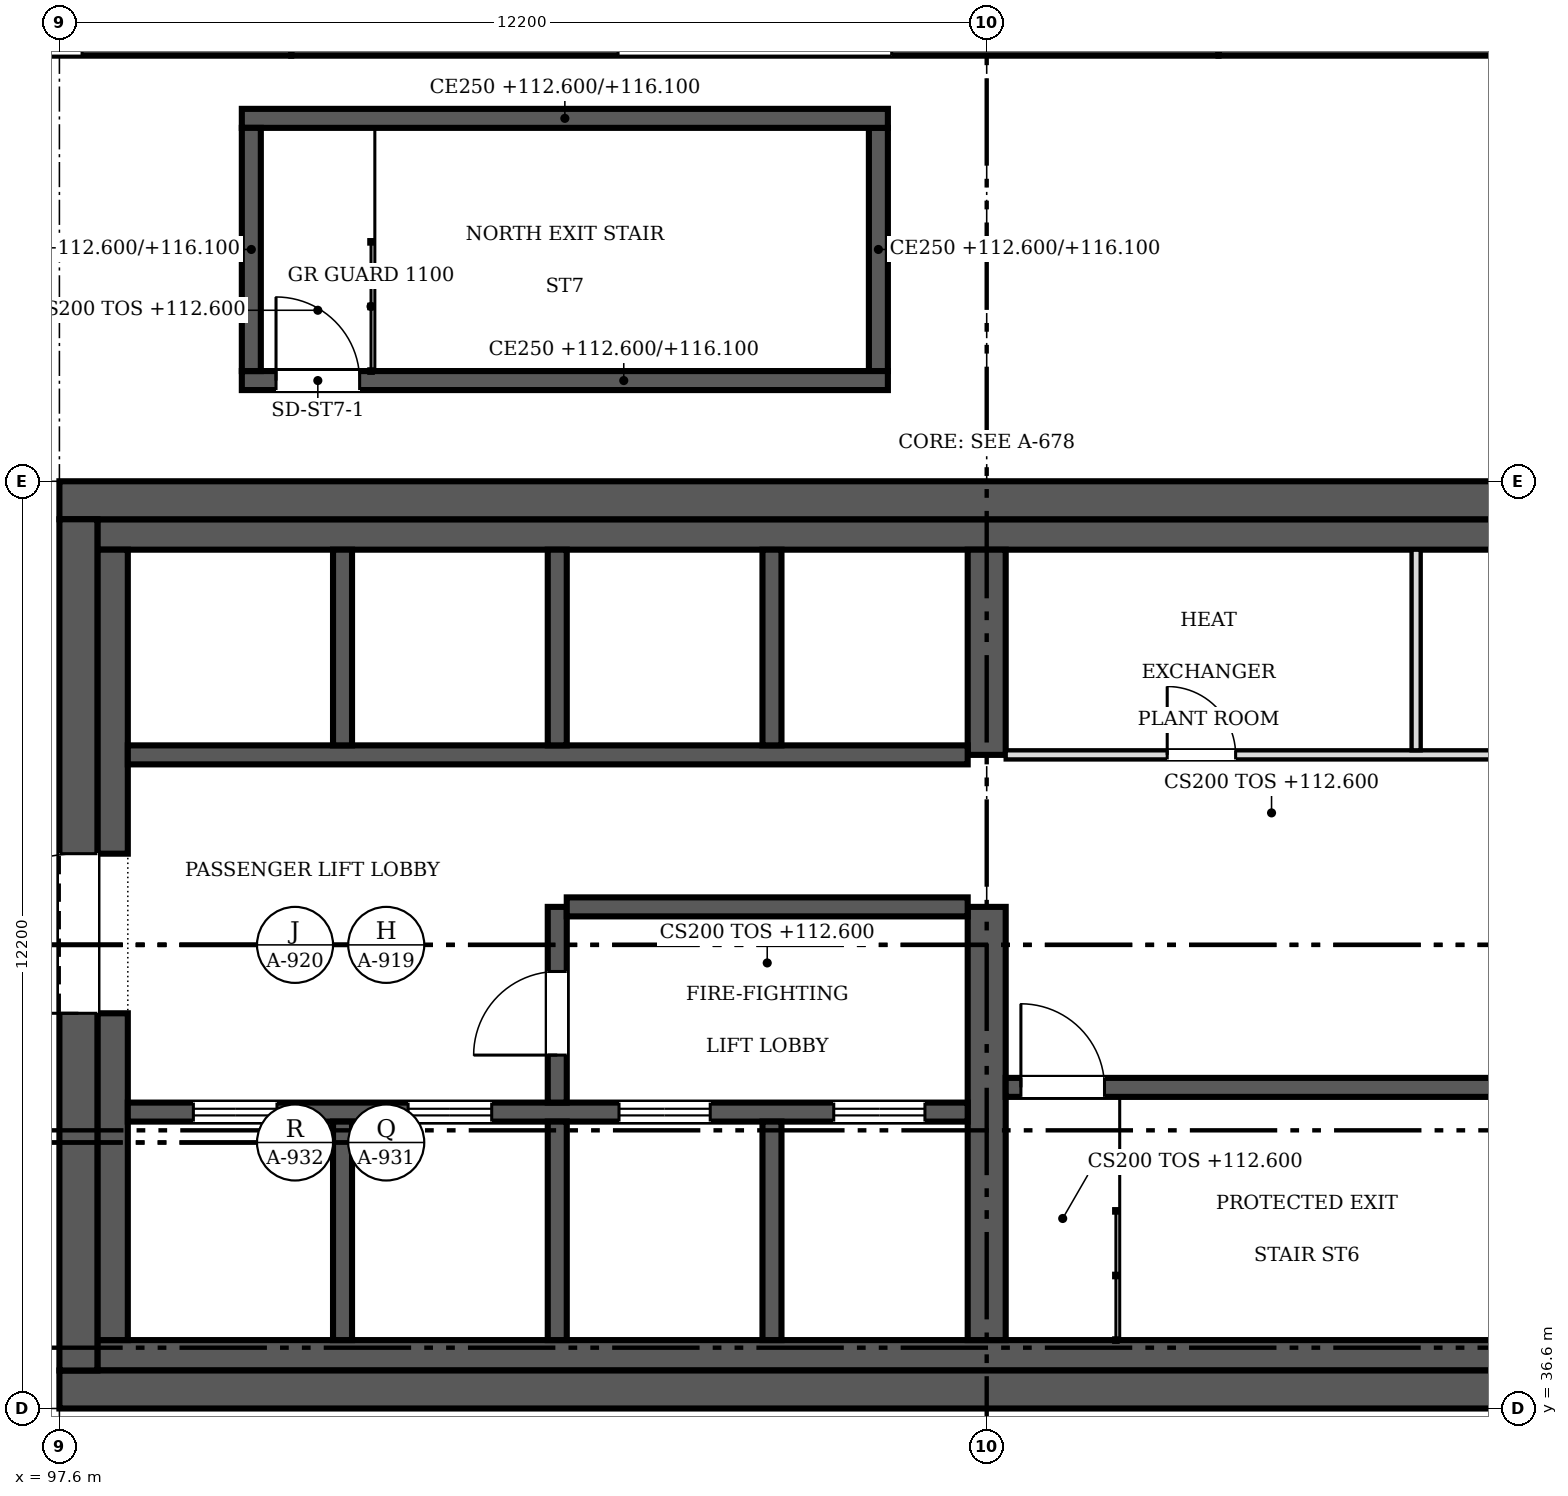
"""IFC4 building model, lengths in metres.
Left out: names, types, materials, properties, quantities, classifications, styles, units other than length and angle.
Written with IfcOpenShell. Run it as: python <this file> out.ifc"""

import sys

from ifc_helpers import new_model, si_unit, direction, frame, frame_2d, origin, place, context, subcontext, project, spatial, polyline, rectangle, outline, extrude, faceted_brep, source, transform, mapped, element, fill, save


model = new_model("IFC4")
c1 = context("Model", 3, precision=1e-05, world=origin(), true_north=direction((0.0, 1.0)))
c2 = subcontext(c1, "Body", "Model", "MODEL_VIEW")
j1 = project(units=[si_unit("LENGTHUNIT", "METRE"), si_unit("PLANEANGLEUNIT", "RADIAN")], contexts=[c1])
p1 = place(None, origin())
s1 = spatial("IfcSite", under=j1, at=p1, CompositionType="ELEMENT")
p2 = place(p1, origin())
s2 = spatial("IfcBuilding", under=s1, at=p2, CompositionType="ELEMENT")
p3 = place(p2, frame((0.0, 0.0, 112.6)))
s3 = spatial("IfcBuildingStorey", under=s2, at=p3, CompositionType="ELEMENT", Elevation=112.6)
m1 = source(origin(), c2, "Body", "Brep", [
    faceted_brep([(0.0, -0.25, 0.0), (11.95, -0.25, 0.0), (11.95, -0.25, 3.8), (0.0, -0.25, 3.8), (0.25, 0.25, 3.8), (11.95, 0.25, 3.8), (11.95, 0.25, 0.0), (0.25, 0.25, 0.0), (0.0, 0.0, 0.0), (0.0, 0.0, 3.8)], [[[0, 1, 2, 3]], [[4, 5, 6, 7]], [[7, 6, 1, 0, 8]], [[6, 5, 2, 1]], [[5, 4, 9, 3, 2]], [[8, 0, 3, 9]], [[7, 8, 9, 4]]]),
])
p4 = place(p3, frame((124.8, 54.65, 0.0), z_axis=(0.0, 0.0, 1.0), x_axis=(-1.0, 0.0, 0.0)))
e1 = element("IfcWall", 1, at=p4, inside=s3, PredefinedType="SOLIDWALL", context=c2, shape_type="MappedRepresentation", body=[
    mapped(m1, transform((0.0, 0.0, 0.0), scale=1.0)),
])
m2 = source(origin(), c2, "Body", "SweptSolid", [
    extrude(outline(polyline([(4.175, 0.8), (7.775, 0.8), (7.775, 3.0), (4.175, 3.0), (4.175, 0.8)])), frame((0.0, 0.26, 0.0), z_axis=(0.0, -1.0, 0.0), x_axis=(1.0, 0.0, 0.0)), (0.0, 0.0, 1.0), 0.52),
])
p5 = place(p4, origin())
e2 = element("IfcOpeningElement", 2, at=p5, cuts=e1, PredefinedType="OPENING", context=c2, shape_type="MappedRepresentation", body=[
    mapped(m2, transform((0.0, 0.0, 0.0), scale=1.0)),
])
m3 = source(origin(), c2, "Body", "SweptSolid", [
    extrude(outline(polyline([(0.0, 0.0), (12.2, 0.0), (12.2, 3.8), (0.0, 3.8), (0.0, 0.0)])), frame((0.0, 0.25, 0.0), z_axis=(0.0, -1.0, 0.0), x_axis=(1.0, 0.0, 0.0)), (0.0, 0.0, 1.0), 0.5),
])
p6 = place(p3, frame((112.85, 54.65, 0.0), z_axis=(0.0, 0.0, 1.0), x_axis=(-1.0, 0.0, 0.0)))
e3 = element("IfcWall", 3, at=p6, inside=s3, PredefinedType="SOLIDWALL", context=c2, shape_type="MappedRepresentation", body=[
    mapped(m3, transform((0.0, 0.0, 0.0), scale=1.0)),
])
m4 = source(origin(), c2, "Body", "SweptSolid", [
    extrude(outline(polyline([(4.3, 0.8), (7.9, 0.8), (7.9, 3.0), (4.3, 3.0), (4.3, 0.8)])), frame((0.0, 0.26, 0.0), z_axis=(0.0, -1.0, 0.0), x_axis=(1.0, 0.0, 0.0)), (0.0, 0.0, 1.0), 0.52),
])
p7 = place(p6, origin())
e4 = element("IfcOpeningElement", 4, at=p7, cuts=e3, PredefinedType="OPENING", context=c2, shape_type="MappedRepresentation", body=[
    mapped(m4, transform((0.0, 0.0, 0.0), scale=1.0)),
])
m5 = source(origin(), c2, "Body", "Brep", [
    faceted_brep([(0.0, -0.25, 0.0), (9.104, -0.25, 0.0), (9.104, -0.25, 3.8), (0.0, -0.25, 3.8), (0.0, 0.25, 3.8), (9.057, 0.25, 3.8), (9.057, 0.25, 0.0), (0.0, 0.25, 0.0), (9.104, -0.0, 0.0), (9.104, -0.0, 3.8)], [[[0, 1, 2, 3]], [[4, 5, 6, 7]], [[7, 6, 8, 1, 0]], [[9, 2, 1, 8]], [[5, 4, 3, 2, 9]], [[4, 7, 0, 3]], [[8, 6, 5, 9]]]),
])
p8 = place(p3, frame((100.65, 54.65, 0.0), z_axis=(0.0, 0.0, 1.0), x_axis=(-1.0, 0.0, 0.0)))
e5 = element("IfcWall", 5, at=p8, inside=s3, PredefinedType="SOLIDWALL", context=c2, shape_type="MappedRepresentation", body=[
    mapped(m5, transform((0.0, 0.0, 0.0), scale=1.0)),
])
m6 = source(origin(), c2, "Body", "SweptSolid", [
    extrude(outline(polyline([(2.752, 0.8), (6.352, 0.8), (6.352, 3.0), (2.752, 3.0), (2.752, 0.8)])), frame((0.0, 0.26, 0.0), z_axis=(0.0, -1.0, 0.0), x_axis=(1.0, 0.0, 0.0)), (0.0, 0.0, 1.0), 0.52),
])
p9 = place(p8, origin())
e6 = element("IfcOpeningElement", 6, at=p9, cuts=e5, PredefinedType="OPENING", context=c2, shape_type="MappedRepresentation", body=[
    mapped(m6, transform((0.0, 0.0, 0.0), scale=1.0)),
])
p10 = place(p3, frame((122.0, 36.85, 0.0), z_axis=(0.0, 0.0, 1.0), x_axis=(-1.0, 0.0, 0.0)))
e7 = element("IfcWall", 7, at=p10, inside=s3, PredefinedType="SHEAR", context=c2, shape_type="SweptSolid", body=[
    extrude(rectangle(XDim=24.4, YDim=0.5, at=frame_2d((12.2, 0.0))), origin(), (0.0, 0.0, 1.0), 3.5),
])
p11 = place(p3, frame((97.85, 37.1, 0.0), z_axis=(0.0, 0.0, 1.0), x_axis=(0.0, 1.0, 0.0)))
e8 = element("IfcWall", 8, at=p11, inside=s3, PredefinedType="SHEAR", context=c2, shape_type="SweptSolid", body=[
    extrude(rectangle(XDim=11.2, YDim=0.5, at=frame_2d((5.6, 0.0))), origin(), (0.0, 0.0, 1.0), 3.5),
])
m7 = source(origin(), c2, "Body", "SweptSolid", [
    extrude(rectangle(XDim=2.1, YDim=2.4, at=frame_2d((1.05, 1.2))), frame((0.0, 0.26, 0.0), z_axis=(0.0, -1.0, 0.0), x_axis=(1.0, 0.0, 0.0)), (0.0, 0.0, 1.0), 0.52),
])
p12 = place(p11, frame((4.7, 0.0, 0.0)))
e9 = element("IfcOpeningElement", 9, at=p12, cuts=e8, PredefinedType="OPENING", context=c2, shape_type="MappedRepresentation", body=[
    mapped(m7, transform((0.0, 0.0, 0.0), scale=1.0)),
])
p13 = place(p3, frame((97.6, 48.55, 0.0), z_axis=(0.0, 0.0, 1.0), x_axis=(1.0, 0.0, 0.0)))
e10 = element("IfcWall", 10, at=p13, inside=s3, PredefinedType="SHEAR", context=c2, shape_type="SweptSolid", body=[
    extrude(rectangle(XDim=24.4, YDim=0.5, at=frame_2d((12.2, 0.0))), origin(), (0.0, 0.0, 1.0), 3.5),
])
for number, where, z_axis, x_axis in (
    (11, (98.1, 37.3, 0.0), (0.0, 0.0, 1.0), (1.0, 0.0, 0.0)),
    (12, (98.1, 48.1, 0.0), (0.0, 0.0, 1.0), (1.0, 0.0, 0.0)),
):
    element("IfcWall", number, at=place(p3, frame(where, z_axis=z_axis, x_axis=x_axis)), inside=s3, PredefinedType="SOLIDWALL", context=c2, shape_type="SweptSolid", body=[
        extrude(rectangle(XDim=23.4, YDim=0.4, at=frame_2d((11.7, 0.0))), origin(), (0.0, 0.0, 1.0), 3.5),
    ])
p14 = place(p3, frame((98.3, 37.5, 0.0), z_axis=(0.0, 0.0, 1.0), x_axis=(0.0, 1.0, 0.0)))
e13 = element("IfcWall", 13, at=p14, inside=s3, PredefinedType="SOLIDWALL", context=c2, shape_type="SweptSolid", body=[
    extrude(rectangle(XDim=4.3, YDim=0.4, at=frame_2d((2.15, 0.0))), origin(), (0.0, 0.0, 1.0), 3.5),
])
p15 = place(p3, frame((98.3, 43.9, 0.0), z_axis=(0.0, 0.0, 1.0), x_axis=(0.0, 1.0, 0.0)))
e14 = element("IfcWall", 14, at=p15, inside=s3, PredefinedType="SOLIDWALL", context=c2, shape_type="SweptSolid", body=[
    extrude(rectangle(XDim=4.0, YDim=0.4, at=frame_2d((2.0, 0.0))), origin(), (0.0, 0.0, 1.0), 3.5),
])
p16 = place(p3, frame((109.8, 37.5, 0.0), z_axis=(0.0, 0.0, 1.0), x_axis=(0.0, 1.0, 0.0)))
e15 = element("IfcWall", 15, at=p16, inside=s3, PredefinedType="SHEAR", context=c2, shape_type="SweptSolid", body=[
    extrude(rectangle(XDim=5.7, YDim=0.5, at=frame_2d((2.85, 0.0))), origin(), (0.0, 0.0, 1.0), 3.5),
])
p17 = place(p3, frame((109.8, 45.2, 0.0), z_axis=(0.0, 0.0, 1.0), x_axis=(0.0, 1.0, 0.0)))
e16 = element("IfcWall", 16, at=p17, inside=s3, PredefinedType="SHEAR", context=c2, shape_type="SweptSolid", body=[
    extrude(rectangle(XDim=2.7, YDim=0.5, at=frame_2d((1.35, 0.0))), origin(), (0.0, 0.0, 1.0), 3.5),
])
p18 = place(p3, frame((98.5, 40.5, 0.0), z_axis=(0.0, 0.0, 1.0), x_axis=(1.0, 0.0, 0.0)))
e17 = element("IfcWall", 17, at=p18, inside=s3, PredefinedType="SOLIDWALL", context=c2, shape_type="SweptSolid", body=[
    extrude(rectangle(XDim=11.05, YDim=0.25, at=frame_2d((5.525, 0.0))), origin(), (0.0, 0.0, 1.0), 3.5),
])
m8 = source(origin(), c2, "Body", "SweptSolid", [
    extrude(rectangle(XDim=1.1, YDim=2.1, at=frame_2d((0.55, 1.05))), frame((0.0, 0.135, 0.0), z_axis=(0.0, -1.0, 0.0), x_axis=(1.0, 0.0, 0.0)), (0.0, 0.0, 1.0), 0.27),
])
p19 = place(p18, frame((0.863, 0.0, 0.0)))
e18 = element("IfcOpeningElement", 18, at=p19, cuts=e17, PredefinedType="OPENING", context=c2, shape_type="MappedRepresentation", body=[
    mapped(m8, transform((0.0, 0.0, 0.0), scale=1.0)),
])
p20 = place(p18, frame((3.688, 0.0, 0.0)))
e19 = element("IfcOpeningElement", 19, at=p20, cuts=e17, PredefinedType="OPENING", context=c2, shape_type="MappedRepresentation", body=[
    mapped(m8, transform((0.0, 0.0, 0.0), scale=1.0)),
])
m9 = source(origin(), c2, "Body", "SweptSolid", [
    extrude(rectangle(XDim=1.2, YDim=2.1, at=frame_2d((0.6, 1.05))), frame((0.0, 0.135, 0.0), z_axis=(0.0, -1.0, 0.0), x_axis=(1.0, 0.0, 0.0)), (0.0, 0.0, 1.0), 0.27),
])
p21 = place(p18, frame((6.462, 0.0, 0.0)))
e20 = element("IfcOpeningElement", 20, at=p21, cuts=e17, PredefinedType="OPENING", context=c2, shape_type="MappedRepresentation", body=[
    mapped(m9, transform((0.0, 0.0, 0.0), scale=1.0)),
])
p22 = place(p18, frame((9.288, 0.0, 0.0)))
e21 = element("IfcOpeningElement", 21, at=p22, cuts=e17, PredefinedType="OPENING", context=c2, shape_type="MappedRepresentation", body=[
    mapped(m9, transform((0.0, 0.0, 0.0), scale=1.0)),
])
p23 = place(p3, frame((98.5, 45.2, 0.0), z_axis=(0.0, 0.0, 1.0), x_axis=(1.0, 0.0, 0.0)))
e22 = element("IfcWall", 22, at=p23, inside=s3, PredefinedType="SOLIDWALL", context=c2, shape_type="SweptSolid", body=[
    extrude(rectangle(XDim=11.05, YDim=0.25, at=frame_2d((5.525, 0.0))), origin(), (0.0, 0.0, 1.0), 3.5),
])
p24 = place(p3, frame((118.1, 40.825, 0.0), z_axis=(0.0, 0.0, 1.0), x_axis=(-1.0, 0.0, 0.0)))
e23 = element("IfcWall", 23, at=p24, inside=s3, PredefinedType="SOLIDWALL", context=c2, shape_type="SweptSolid", body=[
    extrude(rectangle(XDim=8.05, YDim=0.25, at=frame_2d((4.025, 0.0))), origin(), (0.0, 0.0, 1.0), 3.5),
])
p25 = place(p24, frame((6.75, 0.0, 0.0)))
e24 = element("IfcOpeningElement", 24, at=p25, cuts=e23, PredefinedType="OPENING", context=c2, shape_type="MappedRepresentation", body=[
    mapped(m8, transform((0.0, 0.0, 0.0), scale=1.0)),
])
p26 = place(p3, frame((104.15, 37.5, 0.0), z_axis=(0.0, 0.0, 1.0), x_axis=(0.0, 1.0, 0.0)))
e25 = element("IfcWall", 25, at=p26, inside=s3, PredefinedType="SOLIDWALL", context=c2, shape_type="SweptSolid", body=[
    extrude(rectangle(XDim=2.875, YDim=0.25, at=frame_2d((1.438, 0.0))), origin(), (0.0, 0.0, 1.0), 3.5),
])
p27 = place(p3, frame((104.15, 43.2, 0.0), z_axis=(0.0, 0.0, 1.0), x_axis=(0.0, -1.0, 0.0)))
e26 = element("IfcWall", 26, at=p27, inside=s3, PredefinedType="SOLIDWALL", context=c2, shape_type="SweptSolid", body=[
    extrude(rectangle(XDim=2.575, YDim=0.25, at=frame_2d((1.288, 0.0))), origin(), (0.0, 0.0, 1.0), 3.5),
])
p28 = place(p27, frame((0.85, 0.0, 0.0)))
e27 = element("IfcOpeningElement", 27, at=p28, cuts=e26, PredefinedType="OPENING", context=c2, shape_type="MappedRepresentation", body=[
    mapped(m8, transform((0.0, 0.0, 0.0), scale=1.0)),
])
p29 = place(p3, frame((104.275, 43.2, 0.0), z_axis=(0.0, 0.0, 1.0), x_axis=(1.0, 0.0, 0.0)))
e28 = element("IfcWall", 28, at=p29, inside=s3, PredefinedType="SOLIDWALL", context=c2, shape_type="SweptSolid", body=[
    extrude(rectangle(XDim=5.275, YDim=0.25, at=frame_2d((2.638, 0.0))), origin(), (0.0, 0.0, 1.0), 3.5),
])
for number, where, z_axis, x_axis in (
    (29, (101.325, 37.5, 0.0), (0.0, 0.0, 1.0), (0.0, 1.0, 0.0)),
    (30, (106.975, 37.5, 0.0), (0.0, 0.0, 1.0), (0.0, 1.0, 0.0)),
):
    element("IfcWall", number, at=place(p3, frame(where, z_axis=z_axis, x_axis=x_axis)), inside=s3, PredefinedType="SOLIDWALL", context=c2, shape_type="SweptSolid", body=[
        extrude(rectangle(XDim=2.875, YDim=0.25, at=frame_2d((1.438, 0.0))), origin(), (0.0, 0.0, 1.0), 3.5),
    ])
for number, where, z_axis, x_axis in (
    (31, (101.325, 45.325, 0.0), (0.0, 0.0, 1.0), (0.0, 1.0, 0.0)),
    (32, (104.15, 45.325, 0.0), (0.0, 0.0, 1.0), (0.0, 1.0, 0.0)),
    (33, (106.975, 45.325, 0.0), (0.0, 0.0, 1.0), (0.0, 1.0, 0.0)),
):
    element("IfcWall", number, at=place(p3, frame(where, z_axis=z_axis, x_axis=x_axis)), inside=s3, PredefinedType="SOLIDWALL", context=c2, shape_type="SweptSolid", body=[
        extrude(rectangle(XDim=2.575, YDim=0.25, at=frame_2d((1.288, 0.0))), origin(), (0.0, 0.0, 1.0), 3.5),
    ])
p30 = place(p3, frame((110.05, 45.2, 0.0), z_axis=(0.0, 0.0, 1.0), x_axis=(1.0, 0.0, 0.0)))
e34 = element("IfcWall", 34, at=p30, inside=s3, PredefinedType="PARTITIONING", context=c2, shape_type="SweptSolid", body=[
    extrude(rectangle(XDim=11.05, YDim=0.12, at=frame_2d((5.525, 0.0))), origin(), (0.0, 0.0, 1.0), 3.5),
])
m10 = source(origin(), c2, "Body", "SweptSolid", [
    extrude(rectangle(XDim=0.9, YDim=2.1, at=frame_2d((0.45, 1.05))), frame((0.0, 0.07, 0.0), z_axis=(0.0, -1.0, 0.0), x_axis=(1.0, 0.0, 0.0)), (0.0, 0.0, 1.0), 0.14),
])
p31 = place(p30, frame((2.125, 0.0, 0.0)))
e35 = element("IfcOpeningElement", 35, at=p31, cuts=e34, PredefinedType="OPENING", context=c2, shape_type="MappedRepresentation", body=[
    mapped(m10, transform((0.0, 0.0, 0.0), scale=1.0)),
])
p32 = place(p30, frame((7.775, 0.0, 0.0)))
e36 = element("IfcOpeningElement", 36, at=p32, cuts=e34, PredefinedType="OPENING", context=c2, shape_type="MappedRepresentation", body=[
    mapped(m10, transform((0.0, 0.0, 0.0), scale=1.0)),
])
p33 = place(p3, frame((115.45, 45.26, 0.0), z_axis=(0.0, 0.0, 1.0), x_axis=(0.0, 1.0, 0.0)))
e37 = element("IfcWall", 37, at=p33, inside=s3, PredefinedType="PARTITIONING", context=c2, shape_type="SweptSolid", body=[
    extrude(rectangle(XDim=2.64, YDim=0.12, at=frame_2d((1.32, 0.0))), origin(), (0.0, 0.0, 1.0), 3.5),
])
p34 = place(p3, frame((108.5, 50.125, 0.0), z_axis=(0.0, 0.0, 1.0), x_axis=(-1.0, 0.0, 0.0)))
e38 = element("IfcWall", 38, at=p34, inside=s3, PredefinedType="SOLIDWALL", context=c2, shape_type="SweptSolid", body=[
    extrude(rectangle(XDim=8.5, YDim=0.25, at=frame_2d((4.25, 0.0))), origin(), (0.0, 0.0, 1.0), 3.5),
])
p35 = place(p34, frame((6.95, 0.0, 0.0)))
e39 = element("IfcOpeningElement", 39, at=p35, cuts=e38, PredefinedType="OPENING", context=c2, shape_type="MappedRepresentation", body=[
    mapped(m8, transform((0.0, 0.0, 0.0), scale=1.0)),
])
p36 = place(p3, frame((100.125, 50.25, 0.0), z_axis=(0.0, 0.0, 1.0), x_axis=(0.0, 1.0, 0.0)))
e40 = element("IfcWall", 40, at=p36, inside=s3, PredefinedType="SOLIDWALL", context=c2, shape_type="SweptSolid", body=[
    extrude(rectangle(XDim=3.2, YDim=0.25, at=frame_2d((1.6, 0.0))), origin(), (0.0, 0.0, 1.0), 3.5),
])
p37 = place(p3, frame((100.0, 53.575, 0.0), z_axis=(0.0, 0.0, 1.0), x_axis=(1.0, 0.0, 0.0)))
e41 = element("IfcWall", 41, at=p37, inside=s3, PredefinedType="SOLIDWALL", context=c2, shape_type="SweptSolid", body=[
    extrude(rectangle(XDim=8.5, YDim=0.25, at=frame_2d((4.25, 0.0))), origin(), (0.0, 0.0, 1.0), 3.5),
])
p38 = place(p3, frame((108.375, 53.45, 0.0), z_axis=(0.0, 0.0, 1.0), x_axis=(0.0, -1.0, 0.0)))
e42 = element("IfcWall", 42, at=p38, inside=s3, PredefinedType="SOLIDWALL", context=c2, shape_type="SweptSolid", body=[
    extrude(rectangle(XDim=3.2, YDim=0.25, at=frame_2d((1.6, 0.0))), origin(), (0.0, 0.0, 1.0), 3.5),
])
m11 = source(origin(), c2, "Body", "SweptSolid", [
    extrude(rectangle(XDim=2.1, YDim=2.4, at=frame_2d((1.05, 1.2))), frame((0.0, 0.025, 0.0), z_axis=(0.0, -1.0, 0.0), x_axis=(1.0, 0.0, 0.0)), (0.0, 0.0, 1.0), 0.05),
])
p39 = place(p12, origin())
e43 = element("IfcDoor", 43, at=p39, inside=s3, OperationType="DOUBLE_DOOR_SINGLE_SWING", PredefinedType="DOOR", context=c2, shape_type="MappedRepresentation", body=[
    mapped(m11, transform((0.0, 0.0, 0.0), scale=1.0)),
])
fill(e9, e43)
m12 = source(origin(), c2, "Body", "SweptSolid", [
    extrude(rectangle(XDim=1.1, YDim=2.1, at=frame_2d((0.55, 1.05))), frame((0.0, 0.025, 0.0), z_axis=(0.0, -1.0, 0.0), x_axis=(1.0, 0.0, 0.0)), (0.0, 0.0, 1.0), 0.05),
])
p40 = place(p19, origin())
e44 = element("IfcDoor", 44, at=p40, inside=s3, OperationType="DOUBLE_DOOR_SLIDING", PredefinedType="DOOR", context=c2, shape_type="MappedRepresentation", body=[
    mapped(m12, transform((0.0, 0.0, 0.0), scale=1.0)),
])
fill(e18, e44)
p41 = place(p20, origin())
e45 = element("IfcDoor", 45, at=p41, inside=s3, OperationType="DOUBLE_DOOR_SLIDING", PredefinedType="DOOR", context=c2, shape_type="MappedRepresentation", body=[
    mapped(m12, transform((0.0, 0.0, 0.0), scale=1.0)),
])
fill(e19, e45)
m13 = source(origin(), c2, "Body", "SweptSolid", [
    extrude(rectangle(XDim=1.2, YDim=2.1, at=frame_2d((0.6, 1.05))), frame((0.0, 0.025, 0.0), z_axis=(0.0, -1.0, 0.0), x_axis=(1.0, 0.0, 0.0)), (0.0, 0.0, 1.0), 0.05),
])
p42 = place(p21, origin())
e46 = element("IfcDoor", 46, at=p42, inside=s3, OperationType="DOUBLE_DOOR_SLIDING", PredefinedType="DOOR", context=c2, shape_type="MappedRepresentation", body=[
    mapped(m13, transform((0.0, 0.0, 0.0), scale=1.0)),
])
fill(e20, e46)
p43 = place(p22, origin())
e47 = element("IfcDoor", 47, at=p43, inside=s3, OperationType="DOUBLE_DOOR_SLIDING", PredefinedType="DOOR", context=c2, shape_type="MappedRepresentation", body=[
    mapped(m13, transform((0.0, 0.0, 0.0), scale=1.0)),
])
fill(e21, e47)
p44 = place(p25, origin())
e48 = element("IfcDoor", 48, at=p44, inside=s3, OperationType="SINGLE_SWING_RIGHT", PredefinedType="DOOR", context=c2, shape_type="MappedRepresentation", body=[
    mapped(m12, transform((0.0, 0.0, 0.0), scale=1.0)),
])
fill(e24, e48)
p45 = place(p28, origin())
e49 = element("IfcDoor", 49, at=p45, inside=s3, OperationType="SINGLE_SWING_RIGHT", PredefinedType="DOOR", context=c2, shape_type="MappedRepresentation", body=[
    mapped(m12, transform((0.0, 0.0, 0.0), scale=1.0)),
])
fill(e27, e49)
m14 = source(origin(), c2, "Body", "SweptSolid", [
    extrude(rectangle(XDim=0.9, YDim=2.1, at=frame_2d((0.45, 1.05))), frame((0.0, 0.025, 0.0), z_axis=(0.0, -1.0, 0.0), x_axis=(1.0, 0.0, 0.0)), (0.0, 0.0, 1.0), 0.05),
])
p46 = place(p31, origin())
e50 = element("IfcDoor", 50, at=p46, inside=s3, OperationType="SINGLE_SWING_LEFT", PredefinedType="DOOR", context=c2, shape_type="MappedRepresentation", body=[
    mapped(m14, transform((0.0, 0.0, 0.0), scale=1.0)),
])
fill(e35, e50)
p47 = place(p35, origin())
e51 = element("IfcDoor", 51, at=p47, inside=s3, OperationType="SINGLE_SWING_RIGHT", PredefinedType="DOOR", context=c2, shape_type="MappedRepresentation", body=[
    mapped(m12, transform((0.0, 0.0, 0.0), scale=1.0)),
])
fill(e39, e51)
save(model, sys.argv[1])
